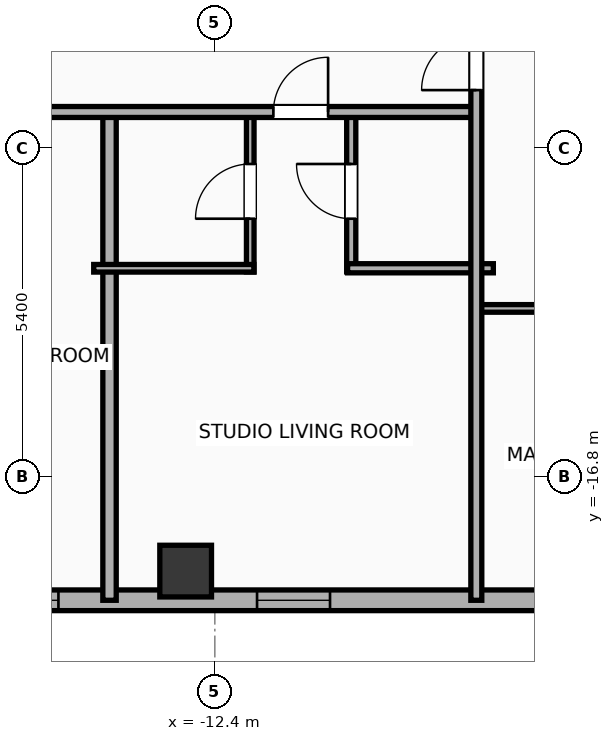
"""IFC4 building model, lengths in metres.
Left out: names, types, materials, properties, quantities, classifications, styles, units other than length and angle.
Written with IfcOpenShell. Run it as: python <this file> out.ifc"""

import sys

from ifc_helpers import new_model, si_unit, direction, frame, frame_2d, origin, origin_2d, place, context, subcontext, project, spatial, rectangle, hollow_rectangle, extrude, element, fill, save


model = new_model("IFC4")
c1 = context("Model", 3, precision=1e-05, world=origin(), true_north=direction((0.0, 1.0)))
c2 = subcontext(c1, "Body", "Model", "MODEL_VIEW")
j1 = project(units=[si_unit("LENGTHUNIT", "METRE"), si_unit("PLANEANGLEUNIT", "RADIAN")], contexts=[c1])
p1 = place(None, origin())
s1 = spatial("IfcSite", under=j1, at=p1, CompositionType="ELEMENT")
p2 = place(p1, origin())
s2 = spatial("IfcBuilding", under=s1, at=p2, CompositionType="ELEMENT")
p3 = place(p2, frame((0.0, 0.0, 223.6)))
s3 = spatial("IfcBuildingStorey", under=s2, at=p3, CompositionType="ELEMENT", Elevation=223.6)
p4 = place(p3, frame((-12.88, -18.35, 0.0), z_axis=(0.0, 0.0, 1.0), x_axis=(1.0, 0.0, 0.0)))
e1 = element("IfcColumn", 1, at=p4, inside=s3, PredefinedType="COLUMN", context=c2, shape_type="SweptSolid", body=[
    extrude(hollow_rectangle(XDim=0.85, YDim=0.85, WallThickness=0.028, at=origin_2d()), origin(), (0.0, 0.0, 1.0), 3.9),
])
p5 = place(p3, frame((26.783, -18.83, 0.0), z_axis=(0.0, 0.0, 1.0), x_axis=(-1.0, 0.0, 0.0)))
e2 = element("IfcWall", 2, at=p5, inside=s3, PredefinedType="ELEMENTEDWALL", context=c2, shape_type="SweptSolid", body=[
    extrude(rectangle(XDim=49.566, YDim=0.34, at=frame_2d((24.783, 0.0))), origin(), (0.0, 0.0, 1.0), 3.65),
])
p6 = place(p5, frame((23.583, 0.0, 0.75)))
e3 = element("IfcOpeningElement", 3, at=p6, cuts=e2, PredefinedType="OPENING", context=c2, shape_type="SweptSolid", body=[
    extrude(rectangle(XDim=2.4, YDim=2.1, at=frame_2d((1.2, 1.05))), frame((0.0, 0.18, 0.0), z_axis=(0.0, -1.0, 0.0), x_axis=(1.0, 0.0, 0.0)), (0.0, 0.0, 1.0), 0.36),
])
p7 = place(p5, frame((41.756, 0.0, 0.75)))
e4 = element("IfcOpeningElement", 4, at=p7, cuts=e2, PredefinedType="OPENING", context=c2, shape_type="SweptSolid", body=[
    extrude(rectangle(XDim=2.4, YDim=2.1, at=frame_2d((1.2, 1.05))), frame((0.0, 0.18, 0.0), z_axis=(0.0, -1.0, 0.0), x_axis=(1.0, 0.0, 0.0)), (0.0, 0.0, 1.0), 0.36),
])
p8 = place(p5, frame((47.222, 0.0, 0.75)))
e5 = element("IfcOpeningElement", 5, at=p8, cuts=e2, PredefinedType="OPENING", context=c2, shape_type="SweptSolid", body=[
    extrude(rectangle(XDim=1.2, YDim=2.05, at=frame_2d((0.6, 1.025))), frame((0.0, 0.18, 0.0), z_axis=(0.0, -1.0, 0.0), x_axis=(1.0, 0.0, 0.0)), (0.0, 0.0, 1.0), 0.36),
])
p9 = place(p5, frame((45.08, 0.0, 0.75)))
e6 = element("IfcOpeningElement", 6, at=p9, cuts=e2, PredefinedType="OPENING", context=c2, shape_type="SweptSolid", body=[
    extrude(rectangle(XDim=1.2, YDim=2.05, at=frame_2d((0.6, 1.025))), frame((0.0, 0.18, 0.0), z_axis=(0.0, -1.0, 0.0), x_axis=(1.0, 0.0, 0.0)), (0.0, 0.0, 1.0), 0.36),
])
p10 = place(p5, frame((37.289, 0.0, 0.75)))
e7 = element("IfcOpeningElement", 7, at=p10, cuts=e2, PredefinedType="OPENING", context=c2, shape_type="SweptSolid", body=[
    extrude(rectangle(XDim=1.2, YDim=2.05, at=frame_2d((0.6, 1.025))), frame((0.0, 0.18, 0.0), z_axis=(0.0, -1.0, 0.0), x_axis=(1.0, 0.0, 0.0)), (0.0, 0.0, 1.0), 0.36),
])
p11 = place(p5, frame((16.115, 0.0, 0.75)))
e8 = element("IfcOpeningElement", 8, at=p11, cuts=e2, PredefinedType="OPENING", context=c2, shape_type="SweptSolid", body=[
    extrude(rectangle(XDim=1.2, YDim=2.05, at=frame_2d((0.6, 1.025))), frame((0.0, 0.18, 0.0), z_axis=(0.0, -1.0, 0.0), x_axis=(1.0, 0.0, 0.0)), (0.0, 0.0, 1.0), 0.36),
])
p12 = place(p5, frame((12.422, 0.0, 0.75)))
e9 = element("IfcOpeningElement", 9, at=p12, cuts=e2, PredefinedType="OPENING", context=c2, shape_type="SweptSolid", body=[
    extrude(rectangle(XDim=1.2, YDim=2.05, at=frame_2d((0.6, 1.025))), frame((0.0, 0.18, 0.0), z_axis=(0.0, -1.0, 0.0), x_axis=(1.0, 0.0, 0.0)), (0.0, 0.0, 1.0), 0.36),
])
p13 = place(p5, frame((8.09, 0.0, 0.75)))
e10 = element("IfcOpeningElement", 10, at=p13, cuts=e2, PredefinedType="OPENING", context=c2, shape_type="SweptSolid", body=[
    extrude(rectangle(XDim=1.2, YDim=2.05, at=frame_2d((0.6, 1.025))), frame((0.0, 0.18, 0.0), z_axis=(0.0, -1.0, 0.0), x_axis=(1.0, 0.0, 0.0)), (0.0, 0.0, 1.0), 0.36),
])
p14 = place(p5, frame((4.637, 0.0, 0.75)))
e11 = element("IfcOpeningElement", 11, at=p14, cuts=e2, PredefinedType="OPENING", context=c2, shape_type="SweptSolid", body=[
    extrude(rectangle(XDim=1.2, YDim=2.05, at=frame_2d((0.6, 1.025))), frame((0.0, 0.18, 0.0), z_axis=(0.0, -1.0, 0.0), x_axis=(1.0, 0.0, 0.0)), (0.0, 0.0, 1.0), 0.36),
])
p15 = place(p5, frame((1.811, 0.0, 0.75)))
e12 = element("IfcOpeningElement", 12, at=p15, cuts=e2, PredefinedType="OPENING", context=c2, shape_type="SweptSolid", body=[
    extrude(rectangle(XDim=1.2, YDim=2.05, at=frame_2d((0.6, 1.025))), frame((0.0, 0.18, 0.0), z_axis=(0.0, -1.0, 0.0), x_axis=(1.0, 0.0, 0.0)), (0.0, 0.0, 1.0), 0.36),
])
p16 = place(p5, frame((32.253, 0.0, 0.75)))
e13 = element("IfcOpeningElement", 13, at=p16, cuts=e2, PredefinedType="OPENING", context=c2, shape_type="SweptSolid", body=[
    extrude(rectangle(XDim=1.2, YDim=2.05, at=frame_2d((0.6, 1.025))), frame((0.0, 0.18, 0.0), z_axis=(0.0, -1.0, 0.0), x_axis=(1.0, 0.0, 0.0)), (0.0, 0.0, 1.0), 0.36),
])
p17 = place(p5, frame((27.853, 0.0, 0.75)))
e14 = element("IfcOpeningElement", 14, at=p17, cuts=e2, PredefinedType="OPENING", context=c2, shape_type="SweptSolid", body=[
    extrude(rectangle(XDim=1.2, YDim=2.05, at=frame_2d((0.6, 1.025))), frame((0.0, 0.18, 0.0), z_axis=(0.0, -1.0, 0.0), x_axis=(1.0, 0.0, 0.0)), (0.0, 0.0, 1.0), 0.36),
])
p18 = place(p5, frame((20.473, 0.0, 0.75)))
e15 = element("IfcOpeningElement", 15, at=p18, cuts=e2, PredefinedType="OPENING", context=c2, shape_type="SweptSolid", body=[
    extrude(rectangle(XDim=1.2, YDim=2.05, at=frame_2d((0.6, 1.025))), frame((0.0, 0.18, 0.0), z_axis=(0.0, -1.0, 0.0), x_axis=(1.0, 0.0, 0.0)), (0.0, 0.0, 1.0), 0.36),
])
p19 = place(p3, frame((-14.132, -18.83, 0.0), z_axis=(0.0, 0.0, 1.0), x_axis=(0.0, 1.0, 0.0)))
e16 = element("IfcWall", 16, at=p19, inside=s3, PredefinedType="PARTITIONING", context=c2, shape_type="SweptSolid", body=[
    extrude(rectangle(XDim=8.11, YDim=0.22, at=frame_2d((4.055, 0.0))), origin(), (0.0, 0.0, 1.0), 3.65),
])
p20 = place(p3, frame((-11.818, -13.43, 0.0), z_axis=(0.0, 0.0, 1.0), x_axis=(0.0, 1.0, 0.0)))
e17 = element("IfcWall", 17, at=p20, inside=s3, PredefinedType="PARTITIONING", context=c2, shape_type="SweptSolid", body=[
    extrude(rectangle(XDim=2.65, YDim=0.125, at=frame_2d((1.325, 0.0))), origin(), (0.0, 0.0, 1.0), 3.65),
])
p21 = place(p20, frame((0.875, 0.0, 0.0)))
e18 = element("IfcOpeningElement", 18, at=p21, cuts=e17, PredefinedType="OPENING", context=c2, shape_type="SweptSolid", body=[
    extrude(rectangle(XDim=0.9, YDim=2.05, at=frame_2d((0.45, 1.025))), frame((0.0, 0.073, 0.0), z_axis=(0.0, -1.0, 0.0), x_axis=(1.0, 0.0, 0.0)), (0.0, 0.0, 1.0), 0.145),
])
p22 = place(p3, frame((-10.157, -13.43, 0.0), z_axis=(0.0, 0.0, 1.0), x_axis=(0.0, 1.0, 0.0)))
e19 = element("IfcWall", 19, at=p22, inside=s3, PredefinedType="PLUMBINGWALL", context=c2, shape_type="SweptSolid", body=[
    extrude(rectangle(XDim=2.65, YDim=0.15, at=frame_2d((1.325, 0.0))), origin(), (0.0, 0.0, 1.0), 3.65),
])
p23 = place(p22, frame((0.875, 0.0, 0.0)))
e20 = element("IfcOpeningElement", 20, at=p23, cuts=e19, PredefinedType="OPENING", context=c2, shape_type="SweptSolid", body=[
    extrude(rectangle(XDim=0.9, YDim=2.05, at=frame_2d((0.45, 1.025))), frame((0.0, 0.085, 0.0), z_axis=(0.0, -1.0, 0.0), x_axis=(1.0, 0.0, 0.0)), (0.0, 0.0, 1.0), 0.17),
])
p24 = place(p3, frame((-14.392, -13.37, 0.0), z_axis=(0.0, 0.0, 1.0), x_axis=(1.0, 0.0, 0.0)))
e21 = element("IfcWall", 21, at=p24, inside=s3, PredefinedType="PARTITIONING", context=c2, shape_type="SweptSolid", body=[
    extrude(rectangle(XDim=2.634, YDim=0.125, at=frame_2d((1.317, 0.0))), origin(), (0.0, 0.0, 1.0), 3.65),
])
p25 = place(p3, frame((-10.217, -13.37, 0.0), z_axis=(0.0, 0.0, 1.0), x_axis=(1.0, 0.0, 0.0)))
e22 = element("IfcWall", 22, at=p25, inside=s3, PredefinedType="PLUMBINGWALL", context=c2, shape_type="SweptSolid", body=[
    extrude(rectangle(XDim=2.397, YDim=0.15, at=frame_2d((1.198, 0.0))), origin(), (0.0, 0.0, 1.0), 3.65),
])
p26 = place(p3, frame((-26.23, -10.8, 0.0), z_axis=(0.0, 0.0, 1.0), x_axis=(1.0, 0.0, 0.0)))
e23 = element("IfcWall", 23, at=p26, inside=s3, PredefinedType="PARTITIONING", context=c2, shape_type="SweptSolid", body=[
    extrude(rectangle(XDim=18.15, YDim=0.18, at=frame_2d((9.075, 0.0))), origin(), (0.0, 0.0, 1.0), 3.65),
])
p27 = place(p26, frame((2.659, 0.0, 0.0)))
e24 = element("IfcOpeningElement", 24, at=p27, cuts=e23, PredefinedType="OPENING", context=c2, shape_type="SweptSolid", body=[
    extrude(rectangle(XDim=0.9, YDim=2.05, at=frame_2d((0.45, 1.025))), frame((0.0, 0.1, 0.0), z_axis=(0.0, -1.0, 0.0), x_axis=(1.0, 0.0, 0.0)), (0.0, 0.0, 1.0), 0.2),
])
p28 = place(p26, frame((9.754, 0.0, 0.0)))
e25 = element("IfcOpeningElement", 25, at=p28, cuts=e23, PredefinedType="OPENING", context=c2, shape_type="SweptSolid", body=[
    extrude(rectangle(XDim=1.15, YDim=2.05, at=frame_2d((0.575, 1.025))), frame((0.0, 0.1, 0.0), z_axis=(0.0, -1.0, 0.0), x_axis=(1.0, 0.0, 0.0)), (0.0, 0.0, 1.0), 0.2),
])
p29 = place(p26, frame((14.792, 0.0, 0.0)))
e26 = element("IfcOpeningElement", 26, at=p29, cuts=e23, PredefinedType="OPENING", context=c2, shape_type="SweptSolid", body=[
    extrude(rectangle(XDim=0.9, YDim=2.05, at=frame_2d((0.45, 1.025))), frame((0.0, 0.1, 0.0), z_axis=(0.0, -1.0, 0.0), x_axis=(1.0, 0.0, 0.0)), (0.0, 0.0, 1.0), 0.2),
])
p30 = place(p3, frame((-8.08, -14.03, 0.0), z_axis=(0.0, 0.0, 1.0), x_axis=(1.0, 0.0, 0.0)))
e27 = element("IfcWall", 27, at=p30, inside=s3, PredefinedType="PARTITIONING", context=c2, shape_type="SweptSolid", body=[
    extrude(rectangle(XDim=8.06, YDim=0.125, at=frame_2d((4.03, 0.0))), origin(), (0.0, 0.0, 1.0), 3.65),
])
p31 = place(p30, frame((1.323, 0.0, 0.0)))
e28 = element("IfcOpeningElement", 28, at=p31, cuts=e27, PredefinedType="OPENING", context=c2, shape_type="SweptSolid", body=[
    extrude(rectangle(XDim=0.9, YDim=2.05, at=frame_2d((0.45, 1.025))), frame((0.0, 0.073, 0.0), z_axis=(0.0, -1.0, 0.0), x_axis=(1.0, 0.0, 0.0)), (0.0, 0.0, 1.0), 0.145),
])
p32 = place(p30, frame((4.547, 0.0, 0.0)))
e29 = element("IfcOpeningElement", 29, at=p32, cuts=e27, PredefinedType="OPENING", context=c2, shape_type="SweptSolid", body=[
    extrude(rectangle(XDim=0.9, YDim=2.05, at=frame_2d((0.45, 1.025))), frame((0.0, 0.073, 0.0), z_axis=(0.0, -1.0, 0.0), x_axis=(1.0, 0.0, 0.0)), (0.0, 0.0, 1.0), 0.145),
])
p33 = place(p3, frame((-8.1, -18.83, 0.0), z_axis=(0.0, 0.0, 1.0), x_axis=(0.0, 1.0, 0.0)))
e30 = element("IfcWall", 30, at=p33, inside=s3, PredefinedType="PARTITIONING", context=c2, shape_type="SweptSolid", body=[
    extrude(rectangle(XDim=9.64, YDim=0.18, at=frame_2d((4.82, 0.0))), origin(), (0.0, 0.0, 1.0), 3.65),
])
p34 = place(p33, frame((8.39, 0.0, 0.0)))
e31 = element("IfcOpeningElement", 31, at=p34, cuts=e30, PredefinedType="OPENING", context=c2, shape_type="SweptSolid", body=[
    extrude(rectangle(XDim=0.9, YDim=2.05, at=frame_2d((0.45, 1.025))), frame((0.0, 0.1, 0.0), z_axis=(0.0, -1.0, 0.0), x_axis=(1.0, 0.0, 0.0)), (0.0, 0.0, 1.0), 0.2),
])
p35 = place(p7, origin())
e32 = element("IfcWindow", 32, at=p35, inside=s3, PartitioningType="SINGLE_PANEL", PredefinedType="WINDOW", context=c2, shape_type="SweptSolid", body=[
    extrude(rectangle(XDim=2.4, YDim=2.1, at=frame_2d((1.2, 1.05))), frame((0.0, 0.03, 0.0), z_axis=(0.0, -1.0, 0.0), x_axis=(1.0, 0.0, 0.0)), (0.0, 0.0, 1.0), 0.06),
])
fill(e4, e32)
p36 = place(p10, origin())
e33 = element("IfcWindow", 33, at=p36, inside=s3, PartitioningType="SINGLE_PANEL", PredefinedType="WINDOW", context=c2, shape_type="SweptSolid", body=[
    extrude(rectangle(XDim=1.2, YDim=2.05, at=frame_2d((0.6, 1.025))), frame((0.0, 0.03, 0.0), z_axis=(0.0, -1.0, 0.0), x_axis=(1.0, 0.0, 0.0)), (0.0, 0.0, 1.0), 0.06),
])
fill(e7, e33)
p37 = place(p21, origin())
e34 = element("IfcDoor", 34, at=p37, inside=s3, OperationType="SINGLE_SWING_LEFT", PredefinedType="DOOR", context=c2, shape_type="SweptSolid", body=[
    extrude(rectangle(XDim=0.9, YDim=2.05, at=frame_2d((0.45, 1.025))), frame((0.0, 0.025, 0.0), z_axis=(0.0, -1.0, 0.0), x_axis=(1.0, 0.0, 0.0)), (0.0, 0.0, 1.0), 0.05),
])
fill(e18, e34)
p38 = place(p23, origin())
e35 = element("IfcDoor", 35, at=p38, inside=s3, OperationType="SINGLE_SWING_RIGHT", PredefinedType="DOOR", context=c2, shape_type="SweptSolid", body=[
    extrude(rectangle(XDim=0.9, YDim=2.05, at=frame_2d((0.45, 1.025))), frame((0.0, 0.025, 0.0), z_axis=(0.0, -1.0, 0.0), x_axis=(1.0, 0.0, 0.0)), (0.0, 0.0, 1.0), 0.05),
])
fill(e20, e35)
p39 = place(p29, origin())
e36 = element("IfcDoor", 36, at=p39, inside=s3, OperationType="SINGLE_SWING_RIGHT", PredefinedType="DOOR", context=c2, shape_type="SweptSolid", body=[
    extrude(rectangle(XDim=0.9, YDim=2.05, at=frame_2d((0.45, 1.025))), frame((0.0, 0.025, 0.0), z_axis=(0.0, -1.0, 0.0), x_axis=(1.0, 0.0, 0.0)), (0.0, 0.0, 1.0), 0.05),
])
fill(e26, e36)
p40 = place(p34, origin())
e37 = element("IfcDoor", 37, at=p40, inside=s3, OperationType="SINGLE_SWING_LEFT", PredefinedType="DOOR", context=c2, shape_type="SweptSolid", body=[
    extrude(rectangle(XDim=0.9, YDim=2.05, at=frame_2d((0.45, 1.025))), frame((0.0, 0.025, 0.0), z_axis=(0.0, -1.0, 0.0), x_axis=(1.0, 0.0, 0.0)), (0.0, 0.0, 1.0), 0.05),
])
fill(e31, e37)
save(model, sys.argv[1])
